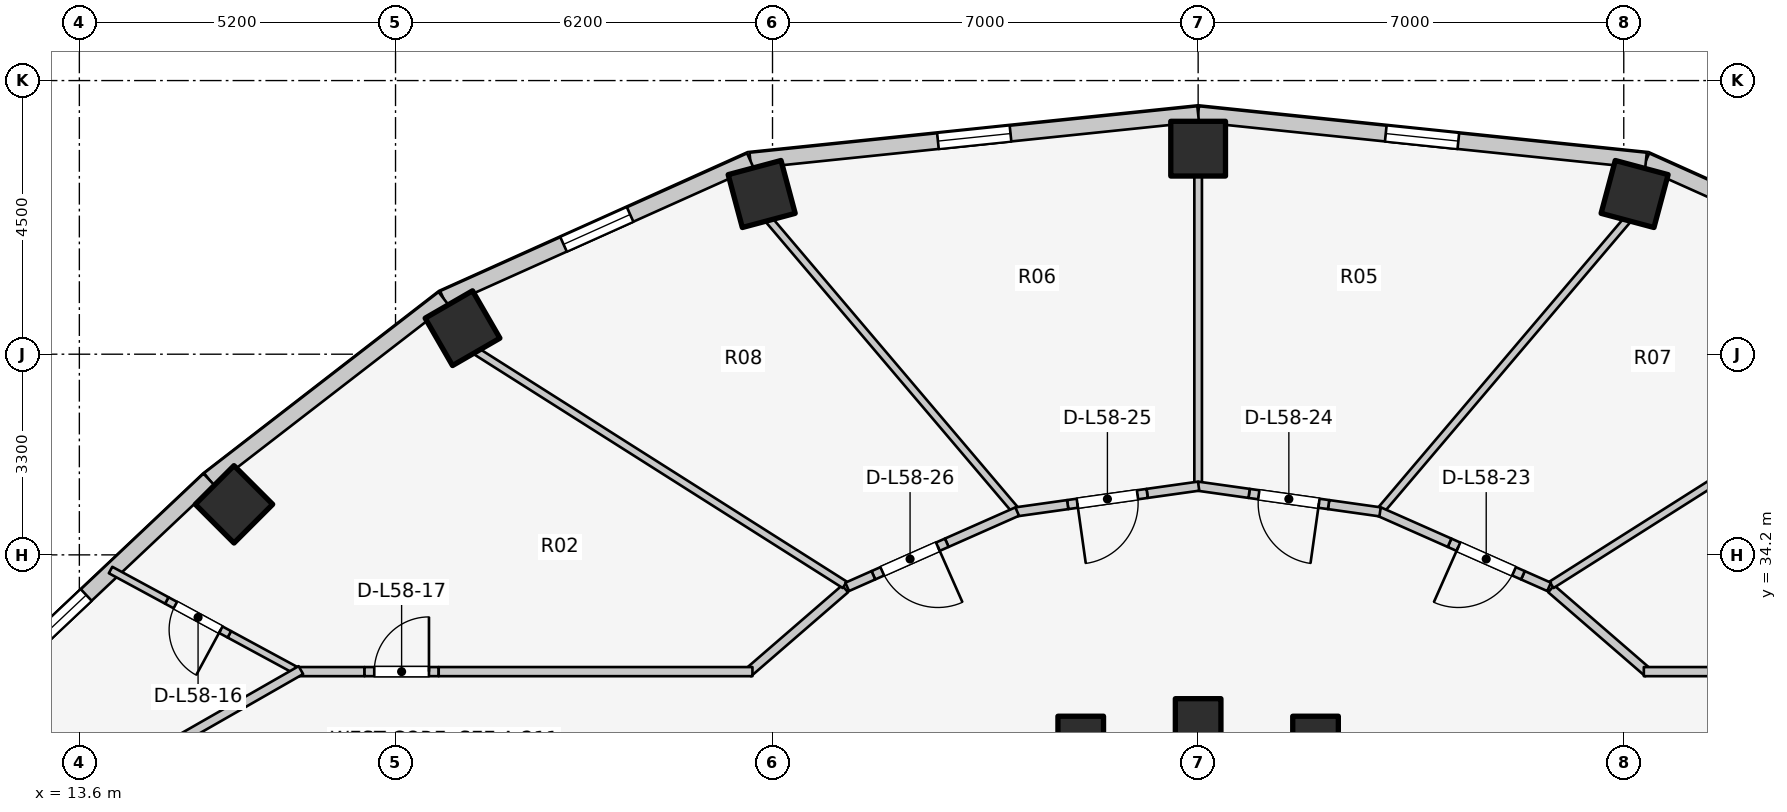
"""IFC4 building model, lengths in metres.
Left out: names, types, materials, properties, quantities, classifications, styles, units other than length and angle.
Written with IfcOpenShell. Run it as: python <this file> out.ifc"""

import sys

from ifc_helpers import new_model, si_unit, direction, frame, frame_2d, origin, origin_2d, place, context, subcontext, project, spatial, rectangle, extrude, element, fill, save


model = new_model("IFC4")
c1 = context("Model", 3, precision=1e-05, world=origin(), true_north=direction((0.0, 1.0)))
c2 = subcontext(c1, "Body", "Model", "MODEL_VIEW")
j1 = project(units=[si_unit("LENGTHUNIT", "METRE"), si_unit("PLANEANGLEUNIT", "RADIAN")], contexts=[c1])
p1 = place(None, origin())
s1 = spatial("IfcSite", under=j1, at=p1, CompositionType="ELEMENT")
p2 = place(p1, origin())
s2 = spatial("IfcBuilding", under=s1, at=p2, CompositionType="ELEMENT")
p3 = place(p2, frame((0.0, 0.0, 190.1)))
s3 = spatial("IfcBuildingStorey", under=s2, at=p3, CompositionType="ELEMENT", Elevation=190.1)
p4 = place(p3, frame((33.931, 31.172, 0.0), z_axis=(0.0, 0.0, 1.0), x_axis=(1.0, 0.0, 0.0)))
e1 = element("IfcColumn", 1, at=p4, inside=s3, PredefinedType="COLUMN", context=c2, shape_type="SweptSolid", body=[
    extrude(rectangle(XDim=0.75, YDim=0.75, at=origin_2d()), origin(), (0.0, 0.0, 1.0), 3.1),
])
p5 = place(p3, frame((39.178, 40.135, 0.0), z_axis=(0.0, 0.0, 1.0), x_axis=(0.258819045103, 0.965925826289, 0.0)))
e2 = element("IfcColumn", 2, at=p5, inside=s3, PredefinedType="COLUMN", context=c2, shape_type="SweptSolid", body=[
    extrude(rectangle(XDim=0.9, YDim=0.9, at=origin_2d()), origin(), (0.0, 0.0, 1.0), 3.1),
])
p6 = place(p3, frame((32.0, 31.46, 0.0), z_axis=(0.0, 0.0, 1.0), x_axis=(1.0, 0.0, 0.0)))
e3 = element("IfcColumn", 3, at=p6, inside=s3, PredefinedType="COLUMN", context=c2, shape_type="SweptSolid", body=[
    extrude(rectangle(XDim=0.75, YDim=0.75, at=origin_2d()), origin(), (0.0, 0.0, 1.0), 3.1),
])
p7 = place(p3, frame((32.0, 40.88, 0.0), z_axis=(0.0, 0.0, 1.0), x_axis=(0.0, 1.0, 0.0)))
e4 = element("IfcColumn", 4, at=p7, inside=s3, PredefinedType="COLUMN", context=c2, shape_type="SweptSolid", body=[
    extrude(rectangle(XDim=0.9, YDim=0.9, at=origin_2d()), origin(), (0.0, 0.0, 1.0), 3.1),
])
p8 = place(p3, frame((30.069, 31.172, 0.0), z_axis=(0.0, 0.0, 1.0), x_axis=(1.0, 0.0, 0.0)))
e5 = element("IfcColumn", 5, at=p8, inside=s3, PredefinedType="COLUMN", context=c2, shape_type="SweptSolid", body=[
    extrude(rectangle(XDim=0.75, YDim=0.75, at=origin_2d()), origin(), (0.0, 0.0, 1.0), 3.1),
])
for number, where, z_axis, x_axis in (
    (6, (24.822, 40.135, 0.0), (0.0, 0.0, 1.0), (-0.259, 0.966, 0.0)),
    (7, (19.902, 37.928, 0.0), (0.0, 0.0, 1.0), (-0.5, 0.866, 0.0)),
    (8, (16.143, 35.031, 0.0), (0.0, 0.0, 1.0), (-0.707, 0.707, 0.0)),
):
    element("IfcColumn", number, at=place(p3, frame(where, z_axis=z_axis, x_axis=x_axis)), inside=s3, PredefinedType="COLUMN", context=c2, shape_type="SweptSolid", body=[
        extrude(rectangle(XDim=0.9, YDim=0.9, at=origin_2d()), origin(), (0.0, 0.0, 1.0), 3.1),
    ])
p9 = place(p3, frame((44.413, 38.419, 0.0), z_axis=(0.0, 0.0, 1.0), x_axis=(-0.912353637112, 0.409403029847, 0.0)))
e9 = element("IfcWall", 9, at=p9, inside=s3, PredefinedType="STANDARD", context=c2, shape_type="SweptSolid", body=[
    extrude(rectangle(XDim=5.533, YDim=0.26, at=frame_2d((2.766, 0.0))), origin(), (0.0, 0.0, 1.0), 1.22),
])
p10 = place(p9, frame((2.167, 0.0, 0.15)))
e10 = element("IfcOpeningElement", 10, at=p10, cuts=e9, PredefinedType="OPENING", context=c2, shape_type="SweptSolid", body=[
    extrude(rectangle(XDim=1.2, YDim=0.9, at=frame_2d((0.6, 0.45))), frame((0.0, 0.14, 0.0), z_axis=(0.0, -1.0, 0.0), x_axis=(1.0, 0.0, 0.0)), (0.0, 0.0, 1.0), 0.28),
])
p11 = place(p3, frame((39.365, 40.685, 0.0), z_axis=(0.0, 0.0, 1.0), x_axis=(-0.994664178965, 0.10316574569, 0.0)))
e11 = element("IfcWall", 11, at=p11, inside=s3, PredefinedType="STANDARD", context=c2, shape_type="SweptSolid", body=[
    extrude(rectangle(XDim=7.405, YDim=0.26, at=frame_2d((3.702, 0.0))), origin(), (0.0, 0.0, 1.0), 1.22),
])
p12 = place(p11, frame((3.102, 0.0, 0.15)))
e12 = element("IfcOpeningElement", 12, at=p12, cuts=e11, PredefinedType="OPENING", context=c2, shape_type="SweptSolid", body=[
    extrude(rectangle(XDim=1.2, YDim=0.9, at=frame_2d((0.6, 0.45))), frame((0.0, 0.14, 0.0), z_axis=(0.0, -1.0, 0.0), x_axis=(1.0, 0.0, 0.0)), (0.0, 0.0, 1.0), 0.28),
])
p13 = place(p3, frame((32.0, 41.448, 0.0), z_axis=(0.0, 0.0, 1.0), x_axis=(-0.994664178965, -0.10316574569, 0.0)))
e13 = element("IfcWall", 13, at=p13, inside=s3, PredefinedType="STANDARD", context=c2, shape_type="SweptSolid", body=[
    extrude(rectangle(XDim=7.405, YDim=0.26, at=frame_2d((3.702, 0.0))), origin(), (0.0, 0.0, 1.0), 1.22),
])
p14 = place(p13, frame((3.102, 0.0, 0.15)))
e14 = element("IfcOpeningElement", 14, at=p14, cuts=e13, PredefinedType="OPENING", context=c2, shape_type="SweptSolid", body=[
    extrude(rectangle(XDim=1.2, YDim=0.9, at=frame_2d((0.6, 0.45))), frame((0.0, 0.14, 0.0), z_axis=(0.0, -1.0, 0.0), x_axis=(1.0, 0.0, 0.0)), (0.0, 0.0, 1.0), 0.28),
])
p15 = place(p3, frame((24.635, 40.685, 0.0), z_axis=(0.0, 0.0, 1.0), x_axis=(-0.912353637112, -0.409403029847, 0.0)))
e15 = element("IfcWall", 15, at=p15, inside=s3, PredefinedType="STANDARD", context=c2, shape_type="SweptSolid", body=[
    extrude(rectangle(XDim=5.533, YDim=0.26, at=frame_2d((2.766, 0.0))), origin(), (0.0, 0.0, 1.0), 1.22),
])
p16 = place(p15, frame((2.167, 0.0, 0.15)))
e16 = element("IfcOpeningElement", 16, at=p16, cuts=e15, PredefinedType="OPENING", context=c2, shape_type="SweptSolid", body=[
    extrude(rectangle(XDim=1.2, YDim=0.9, at=frame_2d((0.6, 0.45))), frame((0.0, 0.14, 0.0), z_axis=(0.0, -1.0, 0.0), x_axis=(1.0, 0.0, 0.0)), (0.0, 0.0, 1.0), 0.28),
])
p17 = place(p3, frame((19.587, 38.419, 0.0), z_axis=(0.0, 0.0, 1.0), x_axis=(-0.791460185804, -0.611220724687, 0.0)))
e17 = element("IfcWall", 17, at=p17, inside=s3, PredefinedType="STANDARD", context=c2, shape_type="SweptSolid", body=[
    extrude(rectangle(XDim=4.872, YDim=0.26, at=frame_2d((2.436, 0.0))), origin(), (0.0, 0.0, 1.0), 1.22),
])
p18 = place(p3, frame((15.731, 35.441, 0.0), z_axis=(0.0, 0.0, 1.0), x_axis=(-0.727667301037, -0.68593024354, 0.0)))
e18 = element("IfcWall", 18, at=p18, inside=s3, PredefinedType="STANDARD", context=c2, shape_type="SweptSolid", body=[
    extrude(rectangle(XDim=4.604, YDim=0.26, at=frame_2d((2.302, 0.0))), origin(), (0.0, 0.0, 1.0), 1.22),
])
p19 = place(p18, frame((2.772, 0.0, 0.15)))
e19 = element("IfcOpeningElement", 19, at=p19, cuts=e18, PredefinedType="OPENING", context=c2, shape_type="SweptSolid", body=[
    extrude(rectangle(XDim=1.2, YDim=0.9, at=frame_2d((0.6, 0.45))), frame((0.0, 0.14, 0.0), z_axis=(0.0, -1.0, 0.0), x_axis=(1.0, 0.0, 0.0)), (0.0, 0.0, 1.0), 0.28),
])
p20 = place(p3, frame((37.807, 33.642, 0.0), z_axis=(0.0, 0.0, 1.0), x_axis=(0.756055312247, -0.654507727092, 0.0)))
e20 = element("IfcWall", 20, at=p20, inside=s3, PredefinedType="PARTITIONING", context=c2, shape_type="SweptSolid", body=[
    extrude(rectangle(XDim=2.111, YDim=0.15, at=frame_2d((1.055, 0.0))), origin(), (0.0, 0.0, 1.0), 1.22),
])
p21 = place(p3, frame((39.33, 32.28, 0.0), z_axis=(0.0, 0.0, 1.0), x_axis=(1.0, 0.0, 0.0)))
e21 = element("IfcWall", 21, at=p21, inside=s3, PredefinedType="PARTITIONING", context=c2, shape_type="SweptSolid", body=[
    extrude(rectangle(XDim=5.06, YDim=0.15, at=frame_2d((2.53, 0.0))), origin(), (0.0, 0.0, 1.0), 1.22),
])
p22 = place(p3, frame((17.244, 32.256, 0.0), z_axis=(0.0, 0.0, 1.0), x_axis=(-0.879396983738, 0.476089219572, 0.0)))
e22 = element("IfcWall", 22, at=p22, inside=s3, PredefinedType="MOVABLE", context=c2, shape_type="SweptSolid", body=[
    extrude(rectangle(XDim=1.338, YDim=0.12, at=frame_2d((0.669, 0.0))), origin(), (0.0, 0.0, 1.0), 1.22),
])
p23 = place(p3, frame((16.067, 32.893, 0.0), z_axis=(0.0, 0.0, 1.0), x_axis=(-0.879342939039, 0.476189033433, 0.0)))
e23 = element("IfcWall", 23, at=p23, inside=s3, PredefinedType="MOVABLE", context=c2, shape_type="SweptSolid", body=[
    extrude(rectangle(XDim=1.17, YDim=0.12, at=frame_2d((0.585, 0.0))), origin(), (0.0, 0.0, 1.0), 2.11),
])
p24 = place(p23, frame((0.16, 0.0, 0.0)))
e24 = element("IfcOpeningElement", 24, at=p24, cuts=e23, PredefinedType="OPENING", context=c2, shape_type="SweptSolid", body=[
    extrude(rectangle(XDim=0.85, YDim=2.05, at=frame_2d((0.425, 1.025))), frame((0.0, 0.07, 0.0), z_axis=(0.0, -1.0, 0.0), x_axis=(1.0, 0.0, 0.0)), (0.0, 0.0, 1.0), 0.14),
])
p25 = place(p3, frame((15.038, 33.45, 0.0), z_axis=(0.0, 0.0, 1.0), x_axis=(-0.879417553007, 0.476051223571, 0.0)))
e25 = element("IfcWall", 25, at=p25, inside=s3, PredefinedType="MOVABLE", context=c2, shape_type="SweptSolid", body=[
    extrude(rectangle(XDim=1.051, YDim=0.12, at=frame_2d((0.526, 0.0))), origin(), (0.0, 0.0, 1.0), 2.575),
])
p26 = place(p3, frame((26.193, 33.642, 0.0), z_axis=(0.0, 0.0, 1.0), x_axis=(-0.756055312247, -0.654507727092, 0.0)))
e26 = element("IfcWall", 26, at=p26, inside=s3, PredefinedType="PARTITIONING", context=c2, shape_type="SweptSolid", body=[
    extrude(rectangle(XDim=2.111, YDim=0.15, at=frame_2d((1.055, 0.0))), origin(), (0.0, 0.0, 1.0), 1.22),
])
p27 = place(p3, frame((17.15, 32.28, 0.0), z_axis=(0.0, 0.0, 1.0), x_axis=(1.0, 0.0, 0.0)))
e27 = element("IfcWall", 27, at=p27, inside=s3, PredefinedType="PARTITIONING", context=c2, shape_type="SweptSolid", body=[
    extrude(rectangle(XDim=1.14, YDim=0.15, at=frame_2d((0.57, 0.0))), origin(), (0.0, 0.0, 1.0), 2.575),
])
p28 = place(p3, frame((18.29, 32.28, 0.0), z_axis=(0.0, 0.0, 1.0), x_axis=(1.0, 0.0, 0.0)))
e28 = element("IfcWall", 28, at=p28, inside=s3, PredefinedType="PARTITIONING", context=c2, shape_type="SweptSolid", body=[
    extrude(rectangle(XDim=1.22, YDim=0.15, at=frame_2d((0.61, 0.0))), origin(), (0.0, 0.0, 1.0), 2.575),
])
p29 = place(p28, frame((0.16, 0.0, 0.0)))
e29 = element("IfcOpeningElement", 29, at=p29, cuts=e28, PredefinedType="OPENING", context=c2, shape_type="SweptSolid", body=[
    extrude(rectangle(XDim=0.9, YDim=2.1, at=frame_2d((0.45, 1.05))), frame((0.0, 0.085, 0.0), z_axis=(0.0, -1.0, 0.0), x_axis=(1.0, 0.0, 0.0)), (0.0, 0.0, 1.0), 0.17),
])
p30 = place(p3, frame((19.51, 32.28, 0.0), z_axis=(0.0, 0.0, 1.0), x_axis=(1.0, 0.0, 0.0)))
e30 = element("IfcWall", 30, at=p30, inside=s3, PredefinedType="PARTITIONING", context=c2, shape_type="SweptSolid", body=[
    extrude(rectangle(XDim=5.16, YDim=0.15, at=frame_2d((2.58, 0.0))), origin(), (0.0, 0.0, 1.0), 1.22),
])
p31 = place(p3, frame((17.243, 32.305, 0.0), z_axis=(0.0, 0.0, 1.0), x_axis=(-0.867991349648, -0.496579315857, 0.0)))
e31 = element("IfcWall", 31, at=p31, inside=s3, PredefinedType="PARTITIONING", context=c2, shape_type="SweptSolid", body=[
    extrude(rectangle(XDim=2.567, YDim=0.15, at=frame_2d((1.283, 0.0))), origin(), (0.0, 0.0, 1.0), 1.22),
])
p32 = place(p3, frame((37.812, 33.708, 0.0), z_axis=(0.0, 0.0, 1.0), x_axis=(0.844640430122, 0.535334048799, 0.0)))
e32 = element("IfcWall", 32, at=p32, inside=s3, PredefinedType="PARTITIONING", context=c2, shape_type="SweptSolid", body=[
    extrude(rectangle(XDim=7.188, YDim=0.125, at=frame_2d((3.594, 0.0))), origin(), (0.0, 0.0, 1.0), 1.22),
])
p33 = place(p3, frame((35.02, 34.952, 0.0), z_axis=(0.0, 0.0, 1.0), x_axis=(0.647173462792, 0.762342776615, 0.0)))
e33 = element("IfcWall", 33, at=p33, inside=s3, PredefinedType="PARTITIONING", context=c2, shape_type="SweptSolid", body=[
    extrude(rectangle(XDim=6.253, YDim=0.125, at=frame_2d((3.127, 0.0))), origin(), (0.0, 0.0, 1.0), 1.22),
])
p34 = place(p3, frame((32.0, 35.385, 0.0), z_axis=(0.0, 0.0, 1.0), x_axis=(0.0, 1.0, 0.0)))
e34 = element("IfcWall", 34, at=p34, inside=s3, PredefinedType="PARTITIONING", context=c2, shape_type="SweptSolid", body=[
    extrude(rectangle(XDim=5.065, YDim=0.125, at=frame_2d((2.532, 0.0))), origin(), (0.0, 0.0, 1.0), 1.22),
])
p35 = place(p3, frame((28.98, 34.952, 0.0), z_axis=(0.0, 0.0, 1.0), x_axis=(-0.647173462792, 0.762342776615, 0.0)))
e35 = element("IfcWall", 35, at=p35, inside=s3, PredefinedType="PARTITIONING", context=c2, shape_type="SweptSolid", body=[
    extrude(rectangle(XDim=6.253, YDim=0.125, at=frame_2d((3.127, 0.0))), origin(), (0.0, 0.0, 1.0), 1.22),
])
p36 = place(p3, frame((26.188, 33.708, 0.0), z_axis=(0.0, 0.0, 1.0), x_axis=(-0.844640430122, 0.535334048799, 0.0)))
e36 = element("IfcWall", 36, at=p36, inside=s3, PredefinedType="PARTITIONING", context=c2, shape_type="SweptSolid", body=[
    extrude(rectangle(XDim=7.188, YDim=0.125, at=frame_2d((3.594, 0.0))), origin(), (0.0, 0.0, 1.0), 1.22),
])
p37 = place(p3, frame((37.772, 33.674, 0.0), z_axis=(0.0, 0.0, 1.0), x_axis=(-0.914387769504, 0.404839482983, 0.0)))
e37 = element("IfcWall", 37, at=p37, inside=s3, PredefinedType="PARTITIONING", context=c2, shape_type="SweptSolid", body=[
    extrude(rectangle(XDim=0.471, YDim=0.15, at=frame_2d((0.235, 0.0))), origin(), (0.0, 0.0, 1.0), 2.575),
])
p38 = place(p3, frame((37.341, 33.865, 0.0), z_axis=(0.0, 0.0, 1.0), x_axis=(-0.914314172667, 0.405005671145, 0.0)))
e38 = element("IfcWall", 38, at=p38, inside=s3, PredefinedType="PARTITIONING", context=c2, shape_type="SweptSolid", body=[
    extrude(rectangle(XDim=1.32, YDim=0.15, at=frame_2d((0.66, 0.0))), origin(), (0.0, 0.0, 1.0), 2.16),
])
p39 = place(p38, frame((0.16, 0.0, 0.0)))
e39 = element("IfcOpeningElement", 39, at=p39, cuts=e38, PredefinedType="OPENING", context=c2, shape_type="SweptSolid", body=[
    extrude(rectangle(XDim=1.0, YDim=2.1, at=frame_2d((0.5, 1.05))), frame((0.0, 0.085, 0.0), z_axis=(0.0, -1.0, 0.0), x_axis=(1.0, 0.0, 0.0)), (0.0, 0.0, 1.0), 0.17),
])
p40 = place(p3, frame((36.134, 34.399, 0.0), z_axis=(0.0, 0.0, 1.0), x_axis=(-0.914311660367, 0.405011342701, 0.0)))
e40 = element("IfcWall", 40, at=p40, inside=s3, PredefinedType="PARTITIONING", context=c2, shape_type="SweptSolid", body=[
    extrude(rectangle(XDim=1.267, YDim=0.15, at=frame_2d((0.633, 0.0))), origin(), (0.0, 0.0, 1.0), 1.22),
])
p41 = place(p3, frame((34.992, 34.908, 0.0), z_axis=(0.0, 0.0, 1.0), x_axis=(-0.990238723834, 0.139381741342, 0.0)))
e41 = element("IfcWall", 41, at=p41, inside=s3, PredefinedType="PARTITIONING", context=c2, shape_type="SweptSolid", body=[
    extrude(rectangle(XDim=0.855, YDim=0.15, at=frame_2d((0.427, 0.0))), origin(), (0.0, 0.0, 1.0), 2.575),
])
p42 = place(p3, frame((34.146, 35.027, 0.0), z_axis=(0.0, 0.0, 1.0), x_axis=(-0.990254187593, 0.139271834751, 0.0)))
e42 = element("IfcWall", 42, at=p42, inside=s3, PredefinedType="PARTITIONING", context=c2, shape_type="SweptSolid", body=[
    extrude(rectangle(XDim=1.32, YDim=0.15, at=frame_2d((0.66, 0.0))), origin(), (0.0, 0.0, 1.0), 2.575),
])
p43 = place(p42, frame((0.16, 0.0, 0.0)))
e43 = element("IfcOpeningElement", 43, at=p43, cuts=e42, PredefinedType="OPENING", context=c2, shape_type="SweptSolid", body=[
    extrude(rectangle(XDim=1.0, YDim=2.1, at=frame_2d((0.5, 1.05))), frame((0.0, 0.085, 0.0), z_axis=(0.0, -1.0, 0.0), x_axis=(1.0, 0.0, 0.0)), (0.0, 0.0, 1.0), 0.17),
])
for number, where, z_axis, x_axis in (
    (44, (32.838, 35.211, 0.0), (0.0, 0.0, 1.0), (-0.99, 0.14, 0.0)),
    (45, (32.008, 35.33, 0.0), (0.0, 0.0, 1.0), (-0.99, -0.14, 0.0)),
):
    element("IfcWall", number, at=place(p3, frame(where, z_axis=z_axis, x_axis=x_axis)), inside=s3, PredefinedType="PARTITIONING", context=c2, shape_type="SweptSolid", body=[
        extrude(rectangle(XDim=0.855, YDim=0.15, at=frame_2d((0.427, 0.0))), origin(), (0.0, 0.0, 1.0), 1.22),
    ])
p44 = place(p3, frame((31.162, 35.211, 0.0), z_axis=(0.0, 0.0, 1.0), x_axis=(-0.990254187593, -0.139271834751, 0.0)))
e46 = element("IfcWall", 46, at=p44, inside=s3, PredefinedType="PARTITIONING", context=c2, shape_type="SweptSolid", body=[
    extrude(rectangle(XDim=1.32, YDim=0.15, at=frame_2d((0.66, 0.0))), origin(), (0.0, 0.0, 1.0), 2.575),
])
p45 = place(p44, frame((0.16, 0.0, 0.0)))
e47 = element("IfcOpeningElement", 47, at=p45, cuts=e46, PredefinedType="OPENING", context=c2, shape_type="SweptSolid", body=[
    extrude(rectangle(XDim=1.0, YDim=2.1, at=frame_2d((0.5, 1.05))), frame((0.0, 0.085, 0.0), z_axis=(0.0, -1.0, 0.0), x_axis=(1.0, 0.0, 0.0)), (0.0, 0.0, 1.0), 0.17),
])
p46 = place(p3, frame((29.854, 35.027, 0.0), z_axis=(0.0, 0.0, 1.0), x_axis=(-0.990238723834, -0.139381741342, 0.0)))
e48 = element("IfcWall", 48, at=p46, inside=s3, PredefinedType="PARTITIONING", context=c2, shape_type="SweptSolid", body=[
    extrude(rectangle(XDim=0.855, YDim=0.15, at=frame_2d((0.427, 0.0))), origin(), (0.0, 0.0, 1.0), 2.575),
])
p47 = place(p3, frame((29.024, 34.912, 0.0), z_axis=(0.0, 0.0, 1.0), x_axis=(-0.914311660367, -0.405011342701, 0.0)))
e49 = element("IfcWall", 49, at=p47, inside=s3, PredefinedType="PARTITIONING", context=c2, shape_type="SweptSolid", body=[
    extrude(rectangle(XDim=1.267, YDim=0.15, at=frame_2d((0.633, 0.0))), origin(), (0.0, 0.0, 1.0), 1.22),
])
p48 = place(p3, frame((27.866, 34.399, 0.0), z_axis=(0.0, 0.0, 1.0), x_axis=(-0.914314172667, -0.405005671145, 0.0)))
e50 = element("IfcWall", 50, at=p48, inside=s3, PredefinedType="PARTITIONING", context=c2, shape_type="SweptSolid", body=[
    extrude(rectangle(XDim=1.32, YDim=0.15, at=frame_2d((0.66, 0.0))), origin(), (0.0, 0.0, 1.0), 2.16),
])
p49 = place(p48, frame((0.16, 0.0, 0.0)))
e51 = element("IfcOpeningElement", 51, at=p49, cuts=e50, PredefinedType="OPENING", context=c2, shape_type="SweptSolid", body=[
    extrude(rectangle(XDim=1.0, YDim=2.1, at=frame_2d((0.5, 1.05))), frame((0.0, 0.085, 0.0), z_axis=(0.0, -1.0, 0.0), x_axis=(1.0, 0.0, 0.0)), (0.0, 0.0, 1.0), 0.17),
])
p50 = place(p3, frame((26.659, 33.865, 0.0), z_axis=(0.0, 0.0, 1.0), x_axis=(-0.914387769504, -0.404839482983, 0.0)))
e52 = element("IfcWall", 52, at=p50, inside=s3, PredefinedType="PARTITIONING", context=c2, shape_type="SweptSolid", body=[
    extrude(rectangle(XDim=0.471, YDim=0.15, at=frame_2d((0.235, 0.0))), origin(), (0.0, 0.0, 1.0), 2.575),
])
p51 = place(p12, origin())
e53 = element("IfcWindow", 53, at=p51, inside=s3, PartitioningType="SINGLE_PANEL", PredefinedType="WINDOW", context=c2, shape_type="SweptSolid", body=[
    extrude(rectangle(XDim=1.2, YDim=0.9, at=frame_2d((0.6, 0.45))), frame((0.0, 0.03, 0.0), z_axis=(0.0, -1.0, 0.0), x_axis=(1.0, 0.0, 0.0)), (0.0, 0.0, 1.0), 0.06),
])
fill(e12, e53)
p52 = place(p14, origin())
e54 = element("IfcWindow", 54, at=p52, inside=s3, PartitioningType="SINGLE_PANEL", PredefinedType="WINDOW", context=c2, shape_type="SweptSolid", body=[
    extrude(rectangle(XDim=1.2, YDim=0.9, at=frame_2d((0.6, 0.45))), frame((0.0, 0.03, 0.0), z_axis=(0.0, -1.0, 0.0), x_axis=(1.0, 0.0, 0.0)), (0.0, 0.0, 1.0), 0.06),
])
fill(e14, e54)
p53 = place(p16, origin())
e55 = element("IfcWindow", 55, at=p53, inside=s3, PartitioningType="SINGLE_PANEL", PredefinedType="WINDOW", context=c2, shape_type="SweptSolid", body=[
    extrude(rectangle(XDim=1.2, YDim=0.9, at=frame_2d((0.6, 0.45))), frame((0.0, 0.03, 0.0), z_axis=(0.0, -1.0, 0.0), x_axis=(1.0, 0.0, 0.0)), (0.0, 0.0, 1.0), 0.06),
])
fill(e16, e55)
p54 = place(p19, origin())
e56 = element("IfcWindow", 56, at=p54, inside=s3, PartitioningType="SINGLE_PANEL", PredefinedType="WINDOW", context=c2, shape_type="SweptSolid", body=[
    extrude(rectangle(XDim=1.2, YDim=0.9, at=frame_2d((0.6, 0.45))), frame((0.0, 0.03, 0.0), z_axis=(0.0, -1.0, 0.0), x_axis=(1.0, 0.0, 0.0)), (0.0, 0.0, 1.0), 0.06),
])
fill(e19, e56)
p55 = place(p24, origin())
e57 = element("IfcDoor", 57, at=p55, inside=s3, OperationType="SINGLE_SWING_LEFT", PredefinedType="DOOR", context=c2, shape_type="SweptSolid", body=[
    extrude(rectangle(XDim=0.85, YDim=2.05, at=frame_2d((0.425, 1.025))), frame((0.0, 0.025, 0.0), z_axis=(0.0, -1.0, 0.0), x_axis=(1.0, 0.0, 0.0)), (0.0, 0.0, 1.0), 0.05),
])
fill(e24, e57)
p56 = place(p29, origin())
e58 = element("IfcDoor", 58, at=p56, inside=s3, OperationType="SINGLE_SWING_RIGHT", PredefinedType="DOOR", context=c2, shape_type="SweptSolid", body=[
    extrude(rectangle(XDim=0.9, YDim=2.1, at=frame_2d((0.45, 1.05))), frame((0.0, 0.025, 0.0), z_axis=(0.0, -1.0, 0.0), x_axis=(1.0, 0.0, 0.0)), (0.0, 0.0, 1.0), 0.05),
])
fill(e29, e58)
p57 = place(p39, origin())
e59 = element("IfcDoor", 59, at=p57, inside=s3, OperationType="SINGLE_SWING_RIGHT", PredefinedType="DOOR", context=c2, shape_type="SweptSolid", body=[
    extrude(rectangle(XDim=1.0, YDim=2.1, at=frame_2d((0.5, 1.05))), frame((0.0, 0.025, 0.0), z_axis=(0.0, -1.0, 0.0), x_axis=(1.0, 0.0, 0.0)), (0.0, 0.0, 1.0), 0.05),
])
fill(e39, e59)
p58 = place(p43, origin())
e60 = element("IfcDoor", 60, at=p58, inside=s3, OperationType="SINGLE_SWING_LEFT", PredefinedType="DOOR", context=c2, shape_type="SweptSolid", body=[
    extrude(rectangle(XDim=1.0, YDim=2.1, at=frame_2d((0.5, 1.05))), frame((0.0, 0.025, 0.0), z_axis=(0.0, -1.0, 0.0), x_axis=(1.0, 0.0, 0.0)), (0.0, 0.0, 1.0), 0.05),
])
fill(e43, e60)
p59 = place(p45, origin())
e61 = element("IfcDoor", 61, at=p59, inside=s3, OperationType="SINGLE_SWING_RIGHT", PredefinedType="DOOR", context=c2, shape_type="SweptSolid", body=[
    extrude(rectangle(XDim=1.0, YDim=2.1, at=frame_2d((0.5, 1.05))), frame((0.0, 0.025, 0.0), z_axis=(0.0, -1.0, 0.0), x_axis=(1.0, 0.0, 0.0)), (0.0, 0.0, 1.0), 0.05),
])
fill(e47, e61)
p60 = place(p49, origin())
e62 = element("IfcDoor", 62, at=p60, inside=s3, OperationType="SINGLE_SWING_LEFT", PredefinedType="DOOR", context=c2, shape_type="SweptSolid", body=[
    extrude(rectangle(XDim=1.0, YDim=2.1, at=frame_2d((0.5, 1.05))), frame((0.0, 0.025, 0.0), z_axis=(0.0, -1.0, 0.0), x_axis=(1.0, 0.0, 0.0)), (0.0, 0.0, 1.0), 0.05),
])
fill(e51, e62)
save(model, sys.argv[1])
